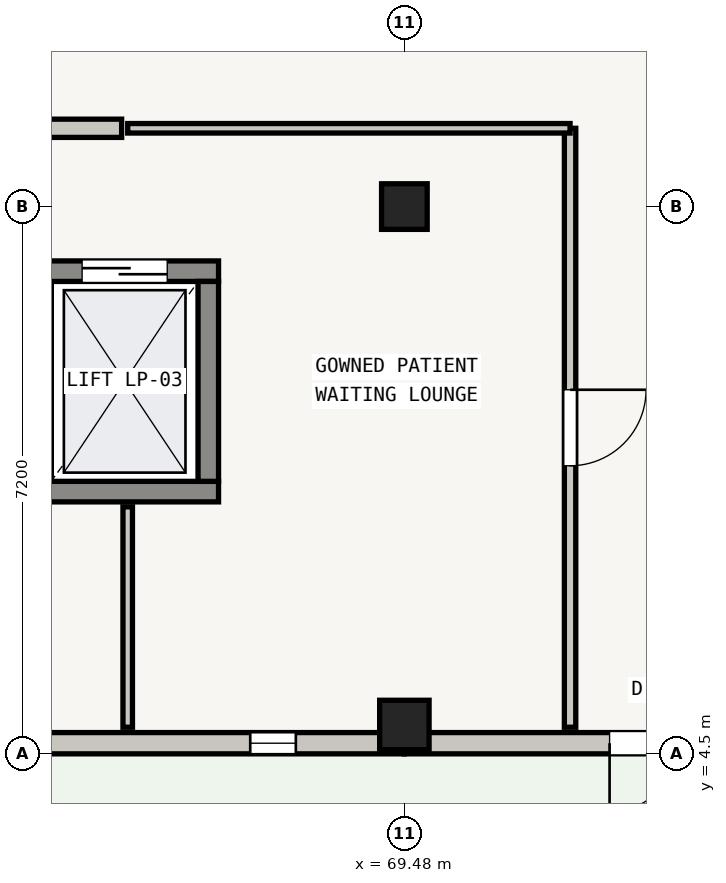
"""IFC4 building model, lengths in metres.
Left out: names, types, materials, properties, quantities, classifications, styles, units other than length and angle.
Written with IfcOpenShell. Run it as: python <this file> out.ifc"""

import sys

from ifc_helpers import new_model, si_unit, direction, frame, frame_2d, origin, origin_2d, place, context, subcontext, project, spatial, rectangle, extrude, element, fill, save


model = new_model("IFC4")
c1 = context("Model", 3, precision=1e-05, world=origin(), true_north=direction((0.0, 1.0)))
c2 = subcontext(c1, "Body", "Model", "MODEL_VIEW")
j1 = project(units=[si_unit("LENGTHUNIT", "METRE"), si_unit("PLANEANGLEUNIT", "RADIAN")], contexts=[c1])
p1 = place(None, origin())
s1 = spatial("IfcSite", under=j1, at=p1, CompositionType="ELEMENT")
p2 = place(p1, origin())
s2 = spatial("IfcBuilding", under=s1, at=p2, CompositionType="ELEMENT")
p3 = place(p2, origin())
s3 = spatial("IfcBuildingStorey", under=s2, at=p3, CompositionType="ELEMENT", Elevation=0.0)
p4 = place(p3, frame((69.48, 4.88, 0.0), z_axis=(0.0, 0.0, 1.0), x_axis=(1.0, 0.0, 0.0)))
e1 = element("IfcColumn", 1, at=p4, inside=s3, PredefinedType="COLUMN", context=c2, shape_type="SweptSolid", body=[
    extrude(rectangle(XDim=0.65, YDim=0.65, at=origin_2d()), origin(), (0.0, 0.0, 1.0), 4.185),
])
p5 = place(p3, frame((69.48, 11.7, 0.0), z_axis=(0.0, 0.0, 1.0), x_axis=(1.0, 0.0, 0.0)))
e2 = element("IfcColumn", 2, at=p5, inside=s3, PredefinedType="COLUMN", context=c2, shape_type="SweptSolid", body=[
    extrude(rectangle(XDim=0.6, YDim=0.6, at=origin_2d()), origin(), (0.0, 0.0, 1.0), 4.185),
])
p6 = place(p3, frame((76.68, 4.64, 0.0), z_axis=(0.0, 0.0, 1.0), x_axis=(-1.0, 0.0, 0.0)))
e3 = element("IfcWall", 3, at=p6, inside=s3, PredefinedType="STANDARD", context=c2, shape_type="SweptSolid", body=[
    extrude(rectangle(XDim=7.2, YDim=0.28, at=frame_2d((3.6, 0.0))), origin(), (0.0, 0.0, 1.0), 3.57),
])
p7 = place(p6, frame((2.7, 0.0, 0.0)))
e4 = element("IfcOpeningElement", 4, at=p7, cuts=e3, PredefinedType="OPENING", context=c2, shape_type="SweptSolid", body=[
    extrude(rectangle(XDim=1.8, YDim=2.1, at=frame_2d((0.9, 1.05))), frame((0.0, 0.14, 0.0), z_axis=(0.0, -1.0, 0.0), x_axis=(1.0, 0.0, 0.0)), (0.0, 0.0, 1.0), 0.28),
])
p8 = place(p3, frame((69.48, 4.64, 0.0), z_axis=(0.0, 0.0, 1.0), x_axis=(-1.0, 0.0, 0.0)))
e5 = element("IfcWall", 5, at=p8, inside=s3, PredefinedType="STANDARD", context=c2, shape_type="SweptSolid", body=[
    extrude(rectangle(XDim=7.2, YDim=0.28, at=frame_2d((3.6, 0.0))), origin(), (0.0, 0.0, 1.0), 3.57),
])
p9 = place(p8, frame((1.428, 0.0, 0.55)))
e6 = element("IfcOpeningElement", 6, at=p9, cuts=e5, PredefinedType="OPENING", context=c2, shape_type="SweptSolid", body=[
    extrude(rectangle(XDim=0.6, YDim=2.28, at=frame_2d((0.3, 1.14))), frame((0.0, 0.14, 0.0), z_axis=(0.0, -1.0, 0.0), x_axis=(1.0, 0.0, 0.0)), (0.0, 0.0, 1.0), 0.28),
])
p10 = place(p8, frame((5.172, 0.0, 0.55)))
e7 = element("IfcOpeningElement", 7, at=p10, cuts=e5, PredefinedType="OPENING", context=c2, shape_type="SweptSolid", body=[
    extrude(rectangle(XDim=0.6, YDim=2.28, at=frame_2d((0.3, 1.14))), frame((0.0, 0.14, 0.0), z_axis=(0.0, -1.0, 0.0), x_axis=(1.0, 0.0, 0.0)), (0.0, 0.0, 1.0), 0.28),
])
p11 = place(p3, frame((67.035, 7.95, 0.0), z_axis=(0.0, 0.0, 1.0), x_axis=(-1.0, 0.0, 0.0)))
e8 = element("IfcWall", 8, at=p11, inside=s3, PredefinedType="SHEAR", context=c2, shape_type="SweptSolid", body=[
    extrude(rectangle(XDim=2.47, YDim=0.27, at=frame_2d((1.235, 0.0))), origin(), (0.0, 0.0, 1.0), 4.185),
])
p12 = place(p3, frame((64.565, 10.85, 0.0), z_axis=(0.0, 0.0, 1.0), x_axis=(1.0, 0.0, 0.0)))
e9 = element("IfcWall", 9, at=p12, inside=s3, PredefinedType="SHEAR", context=c2, shape_type="SweptSolid", body=[
    extrude(rectangle(XDim=2.47, YDim=0.27, at=frame_2d((1.235, 0.0))), origin(), (0.0, 0.0, 1.0), 4.185),
])
p13 = place(p12, frame((0.675, 0.0, 0.0)))
e10 = element("IfcOpeningElement", 10, at=p13, cuts=e9, PredefinedType="OPENING", context=c2, shape_type="SweptSolid", body=[
    extrude(rectangle(XDim=1.12, YDim=2.1, at=frame_2d((0.56, 1.05))), frame((0.0, 0.135, 0.0), z_axis=(0.0, -1.0, 0.0), x_axis=(1.0, 0.0, 0.0)), (0.0, 0.0, 1.0), 0.27),
])
p14 = place(p3, frame((66.9, 10.715, 0.0), z_axis=(0.0, 0.0, 1.0), x_axis=(0.0, -1.0, 0.0)))
e11 = element("IfcWall", 11, at=p14, inside=s3, PredefinedType="SHEAR", context=c2, shape_type="SweptSolid", body=[
    extrude(rectangle(XDim=2.63, YDim=0.27, at=frame_2d((1.315, 0.0))), origin(), (0.0, 0.0, 1.0), 4.185),
])
p15 = place(p3, frame((71.66, 12.73, 0.0), z_axis=(0.0, 0.0, 1.0), x_axis=(0.0, -1.0, 0.0)))
e12 = element("IfcWall", 12, at=p15, inside=s3, PredefinedType="PARTITIONING", context=c2, shape_type="SweptSolid", body=[
    extrude(rectangle(XDim=7.88, YDim=0.15, at=frame_2d((3.94, 0.0))), origin(), (0.0, 0.0, 1.0), 3.205),
])
p16 = place(p15, frame((3.44, 0.0, 0.0)))
e13 = element("IfcOpeningElement", 13, at=p16, cuts=e12, PredefinedType="OPENING", context=c2, shape_type="SweptSolid", body=[
    extrude(rectangle(XDim=1.0, YDim=2.05, at=frame_2d((0.5, 1.025))), frame((0.0, 0.075, 0.0), z_axis=(0.0, -1.0, 0.0), x_axis=(1.0, 0.0, 0.0)), (0.0, 0.0, 1.0), 0.15),
])
p17 = place(p3, frame((65.84, 4.85, 0.0), z_axis=(0.0, 0.0, 1.0), x_axis=(0.0, 1.0, 0.0)))
e14 = element("IfcWall", 14, at=p17, inside=s3, PredefinedType="PARTITIONING", context=c2, shape_type="SweptSolid", body=[
    extrude(rectangle(XDim=2.9, YDim=0.125, at=frame_2d((1.45, 0.0))), origin(), (0.0, 0.0, 1.0), 3.205),
])
p18 = place(p3, frame((65.84, 12.73, 0.0), z_axis=(0.0, 0.0, 1.0), x_axis=(1.0, 0.0, 0.0)))
e15 = element("IfcWall", 15, at=p18, inside=s3, PredefinedType="PARTITIONING", context=c2, shape_type="SweptSolid", body=[
    extrude(rectangle(XDim=5.82, YDim=0.125, at=frame_2d((2.91, 0.0))), origin(), (0.0, 0.0, 1.0), 3.205),
])
p19 = place(p3, frame((59.84, 12.73, 0.0), z_axis=(0.0, 0.0, 1.0), x_axis=(1.0, 0.0, 0.0)))
e16 = element("IfcWall", 16, at=p19, inside=s3, PredefinedType="SOLIDWALL", context=c2, shape_type="SweptSolid", body=[
    extrude(rectangle(XDim=5.92, YDim=0.24, at=frame_2d((2.96, 0.0))), origin(), (0.0, 0.0, 1.0), 3.205),
])
p20 = place(p19, frame((3.427, 0.0, 0.0)))
e17 = element("IfcOpeningElement", 17, at=p20, cuts=e16, PredefinedType="OPENING", context=c2, shape_type="SweptSolid", body=[
    extrude(rectangle(XDim=1.35, YDim=2.1, at=frame_2d((0.675, 1.05))), frame((0.0, 0.12, 0.0), z_axis=(0.0, -1.0, 0.0), x_axis=(1.0, 0.0, 0.0)), (0.0, 0.0, 1.0), 0.24),
])
p21 = place(p7, origin())
e18 = element("IfcDoor", 18, at=p21, inside=s3, OperationType="DOUBLE_DOOR_SINGLE_SWING", PredefinedType="DOOR", context=c2, shape_type="SweptSolid", body=[
    extrude(rectangle(XDim=1.8, YDim=2.1, at=frame_2d((0.9, 1.05))), frame((0.0, 0.025, 0.0), z_axis=(0.0, -1.0, 0.0), x_axis=(1.0, 0.0, 0.0)), (0.0, 0.0, 1.0), 0.05),
])
fill(e4, e18)
p22 = place(p9, origin())
e19 = element("IfcWindow", 19, at=p22, inside=s3, PartitioningType="SINGLE_PANEL", PredefinedType="WINDOW", context=c2, shape_type="SweptSolid", body=[
    extrude(rectangle(XDim=0.6, YDim=2.28, at=frame_2d((0.3, 1.14))), frame((0.0, 0.03, 0.0), z_axis=(0.0, -1.0, 0.0), x_axis=(1.0, 0.0, 0.0)), (0.0, 0.0, 1.0), 0.06),
])
fill(e6, e19)
p23 = place(p13, origin())
e20 = element("IfcDoor", 20, at=p23, inside=s3, OperationType="DOUBLE_DOOR_SLIDING", PredefinedType="DOOR", context=c2, shape_type="SweptSolid", body=[
    extrude(rectangle(XDim=1.12, YDim=2.1, at=frame_2d((0.56, 1.05))), frame((0.0, 0.025, 0.0), z_axis=(0.0, -1.0, 0.0), x_axis=(1.0, 0.0, 0.0)), (0.0, 0.0, 1.0), 0.05),
])
fill(e10, e20)
p24 = place(p16, origin())
e21 = element("IfcDoor", 21, at=p24, inside=s3, OperationType="SINGLE_SWING_LEFT", PredefinedType="DOOR", context=c2, shape_type="SweptSolid", body=[
    extrude(rectangle(XDim=1.0, YDim=2.05, at=frame_2d((0.5, 1.025))), frame((0.0, 0.025, 0.0), z_axis=(0.0, -1.0, 0.0), x_axis=(1.0, 0.0, 0.0)), (0.0, 0.0, 1.0), 0.05),
])
fill(e13, e21)
save(model, sys.argv[1])
